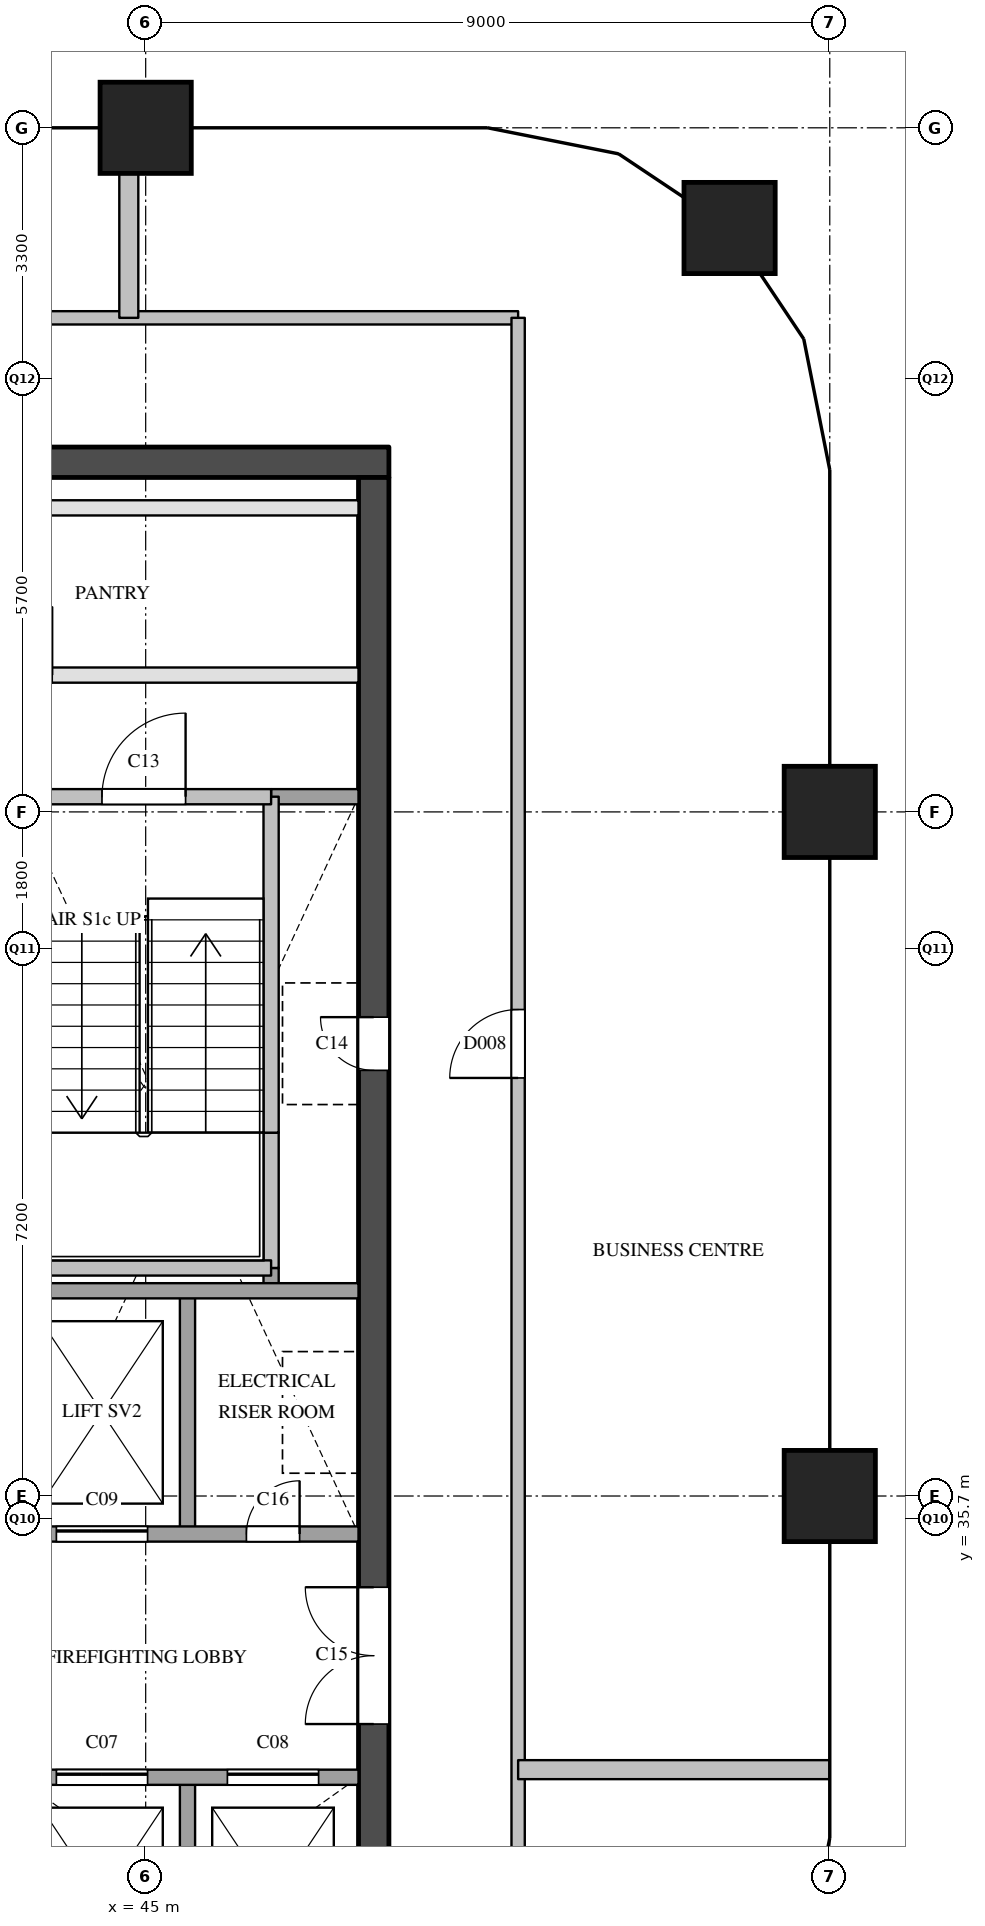
"""IFC4 building model, lengths in metres.
Left out: names, types, materials, properties, quantities, classifications, styles, units other than length and angle.
Written with IfcOpenShell. Run it as: python <this file> out.ifc"""

import sys

from ifc_helpers import new_model, si_unit, direction, frame, frame_2d, origin, origin_2d, place, context, subcontext, project, spatial, rectangle, extrude, element, fill, save


model = new_model("IFC4")
c1 = context("Model", 3, precision=1e-05, world=origin(), true_north=direction((0.0, 1.0)))
c2 = subcontext(c1, "Body", "Model", "MODEL_VIEW")
j1 = project(units=[si_unit("LENGTHUNIT", "METRE"), si_unit("PLANEANGLEUNIT", "RADIAN")], contexts=[c1])
p1 = place(None, origin())
s1 = spatial("IfcSite", under=j1, at=p1, CompositionType="ELEMENT")
p2 = place(p1, origin())
s2 = spatial("IfcBuilding", under=s1, at=p2, CompositionType="ELEMENT")
p3 = place(p2, frame((0.0, 0.0, 203.3)))
s3 = spatial("IfcBuildingStorey", under=s2, at=p3, CompositionType="ELEMENT", Elevation=203.3)
for number, where, z_axis, x_axis in (
    (1, (45.0, 54.0, 0.0), (0.0, 0.0, 1.0), (1.0, 0.0, 0.0)),
    (2, (54.0, 36.0, 0.0), (0.0, 0.0, 1.0), (1.0, 0.0, 0.0)),
    (3, (54.0, 45.0, 0.0), (0.0, 0.0, 1.0), (1.0, 0.0, 0.0)),
    (4, (52.682, 52.682, 0.0), (0.0, 0.0, 1.0), (1.0, 0.0, 0.0)),
):
    element("IfcColumn", number, at=place(p3, frame(where, z_axis=z_axis, x_axis=x_axis)), inside=s3, PredefinedType="COLUMN", context=c2, shape_type="SweptSolid", body=[
        extrude(rectangle(XDim=1.2, YDim=1.2, at=origin_2d()), origin(), (0.0, 0.0, 1.0), 3.9),
    ])
p4 = place(p3, frame((36.2, 49.6, 0.0), z_axis=(0.0, 0.0, 1.0), x_axis=(1.0, 0.0, 0.0)))
e5 = element("IfcWall", 5, at=p4, inside=s3, PredefinedType="SHEAR", context=c2, shape_type="SweptSolid", body=[
    extrude(rectangle(XDim=12.0, YDim=0.4, at=frame_2d((6.0, 0.0))), origin(), (0.0, 0.0, 1.0), 3.6),
])
p5 = place(p3, frame((48.0, 29.1, 0.0), z_axis=(0.0, 0.0, 1.0), x_axis=(0.0, 1.0, 0.0)))
e6 = element("IfcWall", 6, at=p5, inside=s3, PredefinedType="SHEAR", context=c2, shape_type="SweptSolid", body=[
    extrude(rectangle(XDim=20.3, YDim=0.4, at=frame_2d((10.15, 0.0))), origin(), (0.0, 0.0, 1.0), 3.6),
])
p6 = place(p5, frame((12.5, 0.0, 0.0)))
e7 = element("IfcOpeningElement", 7, at=p6, cuts=e6, PredefinedType="OPENING", context=c2, shape_type="SweptSolid", body=[
    extrude(rectangle(XDim=0.7, YDim=2.1, at=frame_2d((0.35, 1.05))), frame((0.0, 0.21, 0.0), z_axis=(0.0, -1.0, 0.0), x_axis=(1.0, 0.0, 0.0)), (0.0, 0.0, 1.0), 0.42),
])
p7 = place(p5, frame((3.9, 0.0, 0.0)))
e8 = element("IfcOpeningElement", 8, at=p7, cuts=e6, PredefinedType="OPENING", context=c2, shape_type="SweptSolid", body=[
    extrude(rectangle(XDim=1.8, YDim=2.1, at=frame_2d((0.9, 1.05))), frame((0.0, 0.21, 0.0), z_axis=(0.0, -1.0, 0.0), x_axis=(1.0, 0.0, 0.0)), (0.0, 0.0, 1.0), 0.42),
])
for number, where, z_axis, x_axis in (
    (9, (45.55, 29.1, 0.0), (0.0, 0.0, 1.0), (0.0, 1.0, 0.0)),
    (10, (45.55, 35.5, 0.0), (0.0, 0.0, 1.0), (0.0, 1.0, 0.0)),
):
    element("IfcWall", number, at=place(p3, frame(where, z_axis=z_axis, x_axis=x_axis)), inside=s3, PredefinedType="SOLIDWALL", context=c2, shape_type="SweptSolid", body=[
        extrude(rectangle(XDim=3.2, YDim=0.2, at=frame_2d((1.6, 0.0))), origin(), (0.0, 0.0, 1.0), 3.6),
    ])
p8 = place(p3, frame((46.65, 38.7, 0.0), z_axis=(0.0, 0.0, 1.0), x_axis=(0.0, 1.0, 0.0)))
e11 = element("IfcWall", 11, at=p8, inside=s3, PredefinedType="SOLIDWALL", context=c2, shape_type="SweptSolid", body=[
    extrude(rectangle(XDim=0.3, YDim=0.2, at=frame_2d((0.15, 0.0))), origin(), (0.0, 0.0, 1.0), 3.6),
])
p9 = place(p3, frame((46.65, 39.0, 0.0), z_axis=(0.0, 0.0, 1.0), x_axis=(0.0, 1.0, 0.0)))
e12 = element("IfcWall", 12, at=p9, inside=s3, PredefinedType="SOLIDWALL", context=c2, shape_type="SweptSolid", body=[
    extrude(rectangle(XDim=1.78, YDim=0.2, at=frame_2d((0.89, 0.0))), origin(), (0.0, 0.0, 1.0), 3.6),
])
p10 = place(p3, frame((46.65, 40.78, 0.0), z_axis=(0.0, 0.0, 1.0), x_axis=(0.0, 1.0, 0.0)))
e13 = element("IfcWall", 13, at=p10, inside=s3, PredefinedType="SOLIDWALL", context=c2, shape_type="SweptSolid", body=[
    extrude(rectangle(XDim=4.42, YDim=0.2, at=frame_2d((2.21, 0.0))), origin(), (0.0, 0.0, 1.0), 3.6),
])
p11 = place(p3, frame((36.6, 32.3, 0.0), z_axis=(0.0, 0.0, 1.0), x_axis=(1.0, 0.0, 0.0)))
e14 = element("IfcWall", 14, at=p11, inside=s3, PredefinedType="SOLIDWALL", context=c2, shape_type="SweptSolid", body=[
    extrude(rectangle(XDim=11.2, YDim=0.2, at=frame_2d((5.6, 0.0))), origin(), (0.0, 0.0, 1.0), 3.6),
])
p12 = place(p11, frame((7.225, 0.0, 0.0)))
e15 = element("IfcOpeningElement", 15, at=p12, cuts=e14, PredefinedType="OPENING", context=c2, shape_type="SweptSolid", body=[
    extrude(rectangle(XDim=1.2, YDim=2.1, at=frame_2d((0.6, 1.05))), frame((0.0, 0.11, 0.0), z_axis=(0.0, -1.0, 0.0), x_axis=(1.0, 0.0, 0.0)), (0.0, 0.0, 1.0), 0.22),
])
p13 = place(p11, frame((9.475, 0.0, 0.0)))
e16 = element("IfcOpeningElement", 16, at=p13, cuts=e14, PredefinedType="OPENING", context=c2, shape_type="SweptSolid", body=[
    extrude(rectangle(XDim=1.2, YDim=2.1, at=frame_2d((0.6, 1.05))), frame((0.0, 0.11, 0.0), z_axis=(0.0, -1.0, 0.0), x_axis=(1.0, 0.0, 0.0)), (0.0, 0.0, 1.0), 0.22),
])
p14 = place(p3, frame((43.3, 35.5, 0.0), z_axis=(0.0, 0.0, 1.0), x_axis=(1.0, 0.0, 0.0)))
e17 = element("IfcWall", 17, at=p14, inside=s3, PredefinedType="SOLIDWALL", context=c2, shape_type="SweptSolid", body=[
    extrude(rectangle(XDim=4.5, YDim=0.2, at=frame_2d((2.25, 0.0))), origin(), (0.0, 0.0, 1.0), 3.6),
])
p15 = place(p14, frame((0.525, 0.0, 0.0)))
e18 = element("IfcOpeningElement", 18, at=p15, cuts=e17, PredefinedType="OPENING", context=c2, shape_type="SweptSolid", body=[
    extrude(rectangle(XDim=1.2, YDim=2.1, at=frame_2d((0.6, 1.05))), frame((0.0, 0.11, 0.0), z_axis=(0.0, -1.0, 0.0), x_axis=(1.0, 0.0, 0.0)), (0.0, 0.0, 1.0), 0.22),
])
p16 = place(p14, frame((3.025, 0.0, 0.0)))
e19 = element("IfcOpeningElement", 19, at=p16, cuts=e17, PredefinedType="OPENING", context=c2, shape_type="SweptSolid", body=[
    extrude(rectangle(XDim=0.7, YDim=2.1, at=frame_2d((0.35, 1.05))), frame((0.0, 0.11, 0.0), z_axis=(0.0, -1.0, 0.0), x_axis=(1.0, 0.0, 0.0)), (0.0, 0.0, 1.0), 0.22),
])
p17 = place(p3, frame((43.3, 38.7, 0.0), z_axis=(0.0, 0.0, 1.0), x_axis=(1.0, 0.0, 0.0)))
e20 = element("IfcWall", 20, at=p17, inside=s3, PredefinedType="SOLIDWALL", context=c2, shape_type="SweptSolid", body=[
    extrude(rectangle(XDim=4.5, YDim=0.2, at=frame_2d((2.25, 0.0))), origin(), (0.0, 0.0, 1.0), 3.6),
])
p18 = place(p3, frame((43.4, 39.0, 0.0), z_axis=(0.0, 0.0, 1.0), x_axis=(1.0, 0.0, 0.0)))
e21 = element("IfcWall", 21, at=p18, inside=s3, PredefinedType="SOLIDWALL", context=c2, shape_type="SweptSolid", body=[
    extrude(rectangle(XDim=3.25, YDim=0.2, at=frame_2d((1.625, 0.0))), origin(), (0.0, 0.0, 1.0), 3.6),
])
p19 = place(p3, frame((46.65, 45.2, 0.0), z_axis=(0.0, 0.0, 1.0), x_axis=(1.0, 0.0, 0.0)))
e22 = element("IfcWall", 22, at=p19, inside=s3, PredefinedType="SOLIDWALL", context=c2, shape_type="SweptSolid", body=[
    extrude(rectangle(XDim=1.15, YDim=0.2, at=frame_2d((0.575, 0.0))), origin(), (0.0, 0.0, 1.0), 3.6),
])
p20 = place(p3, frame((36.6, 45.2, 0.0), z_axis=(0.0, 0.0, 1.0), x_axis=(1.0, 0.0, 0.0)))
e23 = element("IfcWall", 23, at=p20, inside=s3, PredefinedType="SOLIDWALL", context=c2, shape_type="SweptSolid", body=[
    extrude(rectangle(XDim=10.05, YDim=0.2, at=frame_2d((5.025, 0.0))), origin(), (0.0, 0.0, 1.0), 3.6),
])
p21 = place(p20, frame((1.125, 0.0, 0.0)))
e24 = element("IfcOpeningElement", 24, at=p21, cuts=e23, PredefinedType="OPENING", context=c2, shape_type="SweptSolid", body=[
    extrude(rectangle(XDim=1.1, YDim=2.1, at=frame_2d((0.55, 1.05))), frame((0.0, 0.11, 0.0), z_axis=(0.0, -1.0, 0.0), x_axis=(1.0, 0.0, 0.0)), (0.0, 0.0, 1.0), 0.22),
])
p22 = place(p20, frame((4.475, 0.0, 0.0)))
e25 = element("IfcOpeningElement", 25, at=p22, cuts=e23, PredefinedType="OPENING", context=c2, shape_type="SweptSolid", body=[
    extrude(rectangle(XDim=1.1, YDim=2.1, at=frame_2d((0.55, 1.05))), frame((0.0, 0.11, 0.0), z_axis=(0.0, -1.0, 0.0), x_axis=(1.0, 0.0, 0.0)), (0.0, 0.0, 1.0), 0.22),
])
p23 = place(p20, frame((7.825, 0.0, 0.0)))
e26 = element("IfcOpeningElement", 26, at=p23, cuts=e23, PredefinedType="OPENING", context=c2, shape_type="SweptSolid", body=[
    extrude(rectangle(XDim=1.1, YDim=2.1, at=frame_2d((0.55, 1.05))), frame((0.0, 0.11, 0.0), z_axis=(0.0, -1.0, 0.0), x_axis=(1.0, 0.0, 0.0)), (0.0, 0.0, 1.0), 0.22),
])
p24 = place(p3, frame((36.6, 46.8, 0.0), z_axis=(0.0, 0.0, 1.0), x_axis=(1.0, 0.0, 0.0)))
e27 = element("IfcWall", 27, at=p24, inside=s3, PredefinedType="PARTITIONING", context=c2, shape_type="SweptSolid", body=[
    extrude(rectangle(XDim=11.2, YDim=0.2, at=frame_2d((5.6, 0.0))), origin(), (0.0, 0.0, 1.0), 3.6),
])
p25 = place(p24, frame((0.67, 0.0, 0.0)))
e28 = element("IfcOpeningElement", 28, at=p25, cuts=e27, PredefinedType="OPENING", context=c2, shape_type="SweptSolid", body=[
    extrude(rectangle(XDim=0.9, YDim=2.1, at=frame_2d((0.45, 1.05))), frame((0.0, 0.11, 0.0), z_axis=(0.0, -1.0, 0.0), x_axis=(1.0, 0.0, 0.0)), (0.0, 0.0, 1.0), 0.22),
])
p26 = place(p24, frame((6.27, 0.0, 0.0)))
e29 = element("IfcOpeningElement", 29, at=p26, cuts=e27, PredefinedType="OPENING", context=c2, shape_type="SweptSolid", body=[
    extrude(rectangle(XDim=0.9, YDim=2.1, at=frame_2d((0.45, 1.05))), frame((0.0, 0.11, 0.0), z_axis=(0.0, -1.0, 0.0), x_axis=(1.0, 0.0, 0.0)), (0.0, 0.0, 1.0), 0.22),
])
p27 = place(p3, frame((36.6, 49.0, 0.0), z_axis=(0.0, 0.0, 1.0), x_axis=(1.0, 0.0, 0.0)))
e30 = element("IfcWall", 30, at=p27, inside=s3, PredefinedType="PARTITIONING", context=c2, shape_type="SweptSolid", body=[
    extrude(rectangle(XDim=11.2, YDim=0.2, at=frame_2d((5.6, 0.0))), origin(), (0.0, 0.0, 1.0), 3.6),
])
p28 = place(p3, frame((34.5, 51.5, 0.0), z_axis=(0.0, 0.0, 1.0), x_axis=(1.0, 0.0, 0.0)))
e31 = element("IfcWall", 31, at=p28, inside=s3, PredefinedType="PARTITIONING", context=c2, shape_type="SweptSolid", body=[
    extrude(rectangle(XDim=15.4, YDim=0.175, at=frame_2d((7.7, 0.0))), origin(), (0.0, 0.0, 1.0), 3.6),
])
p29 = place(p28, frame((4.689, 0.0, 0.0)))
e32 = element("IfcOpeningElement", 32, at=p29, cuts=e31, PredefinedType="OPENING", context=c2, shape_type="SweptSolid", body=[
    extrude(rectangle(XDim=0.9, YDim=2.1, at=frame_2d((0.45, 1.05))), frame((0.0, 0.097, 0.0), z_axis=(0.0, -1.0, 0.0), x_axis=(1.0, 0.0, 0.0)), (0.0, 0.0, 1.0), 0.195),
])
p30 = place(p3, frame((49.9, 28.5, 0.0), z_axis=(0.0, 0.0, 1.0), x_axis=(0.0, 1.0, 0.0)))
e33 = element("IfcWall", 33, at=p30, inside=s3, PredefinedType="PARTITIONING", context=c2, shape_type="SweptSolid", body=[
    extrude(rectangle(XDim=23.0, YDim=0.175, at=frame_2d((11.5, 0.0))), origin(), (0.0, 0.0, 1.0), 3.6),
])
p31 = place(p30, frame((13.0, 0.0, 0.0)))
e34 = element("IfcOpeningElement", 34, at=p31, cuts=e33, PredefinedType="OPENING", context=c2, shape_type="SweptSolid", body=[
    extrude(rectangle(XDim=0.9, YDim=2.1, at=frame_2d((0.45, 1.05))), frame((0.0, 0.097, 0.0), z_axis=(0.0, -1.0, 0.0), x_axis=(1.0, 0.0, 0.0)), (0.0, 0.0, 1.0), 0.195),
])
p32 = place(p3, frame((49.9, 32.4, 0.0), z_axis=(0.0, 0.0, 1.0), x_axis=(1.0, 0.0, 0.0)))
e35 = element("IfcWall", 35, at=p32, inside=s3, PredefinedType="PARTITIONING", context=c2, shape_type="SweptSolid", body=[
    extrude(rectangle(XDim=4.1, YDim=0.25, at=frame_2d((2.05, 0.0))), origin(), (0.0, 0.0, 1.0), 2.6),
])
p33 = place(p3, frame((44.778, 51.5, 0.0), z_axis=(0.0, 0.0, 1.0), x_axis=(0.0, 1.0, 0.0)))
e36 = element("IfcWall", 36, at=p33, inside=s3, PredefinedType="PARTITIONING", context=c2, shape_type="SweptSolid", body=[
    extrude(rectangle(XDim=2.5, YDim=0.25, at=frame_2d((1.25, 0.0))), origin(), (0.0, 0.0, 1.0), 3.6),
])
p34 = place(p12, origin())
e37 = element("IfcDoor", 37, at=p34, inside=s3, OperationType="SLIDING_TO_LEFT", PredefinedType="DOOR", context=c2, shape_type="SweptSolid", body=[
    extrude(rectangle(XDim=1.2, YDim=2.1, at=frame_2d((0.6, 1.05))), frame((0.0, 0.025, 0.0), z_axis=(0.0, -1.0, 0.0), x_axis=(1.0, 0.0, 0.0)), (0.0, 0.0, 1.0), 0.05),
])
fill(e15, e37)
p35 = place(p13, origin())
e38 = element("IfcDoor", 38, at=p35, inside=s3, OperationType="SLIDING_TO_LEFT", PredefinedType="DOOR", context=c2, shape_type="SweptSolid", body=[
    extrude(rectangle(XDim=1.2, YDim=2.1, at=frame_2d((0.6, 1.05))), frame((0.0, 0.025, 0.0), z_axis=(0.0, -1.0, 0.0), x_axis=(1.0, 0.0, 0.0)), (0.0, 0.0, 1.0), 0.05),
])
fill(e16, e38)
p36 = place(p15, origin())
e39 = element("IfcDoor", 39, at=p36, inside=s3, OperationType="SLIDING_TO_LEFT", PredefinedType="DOOR", context=c2, shape_type="SweptSolid", body=[
    extrude(rectangle(XDim=1.2, YDim=2.1, at=frame_2d((0.6, 1.05))), frame((0.0, 0.025, 0.0), z_axis=(0.0, -1.0, 0.0), x_axis=(1.0, 0.0, 0.0)), (0.0, 0.0, 1.0), 0.05),
])
fill(e18, e39)
p37 = place(p23, origin())
e40 = element("IfcDoor", 40, at=p37, inside=s3, OperationType="SINGLE_SWING_RIGHT", PredefinedType="DOOR", context=c2, shape_type="SweptSolid", body=[
    extrude(rectangle(XDim=1.1, YDim=2.1, at=frame_2d((0.55, 1.05))), frame((0.0, 0.025, 0.0), z_axis=(0.0, -1.0, 0.0), x_axis=(1.0, 0.0, 0.0)), (0.0, 0.0, 1.0), 0.05),
])
fill(e26, e40)
p38 = place(p6, origin())
e41 = element("IfcDoor", 41, at=p38, inside=s3, OperationType="SINGLE_SWING_RIGHT", PredefinedType="DOOR", context=c2, shape_type="SweptSolid", body=[
    extrude(rectangle(XDim=0.7, YDim=2.1, at=frame_2d((0.35, 1.05))), frame((0.0, 0.025, 0.0), z_axis=(0.0, -1.0, 0.0), x_axis=(1.0, 0.0, 0.0)), (0.0, 0.0, 1.0), 0.05),
])
fill(e7, e41)
p39 = place(p7, origin())
e42 = element("IfcDoor", 42, at=p39, inside=s3, OperationType="DOUBLE_DOOR_SINGLE_SWING", PredefinedType="DOOR", context=c2, shape_type="SweptSolid", body=[
    extrude(rectangle(XDim=1.8, YDim=2.1, at=frame_2d((0.9, 1.05))), frame((0.0, 0.025, 0.0), z_axis=(0.0, -1.0, 0.0), x_axis=(1.0, 0.0, 0.0)), (0.0, 0.0, 1.0), 0.05),
])
fill(e8, e42)
p40 = place(p16, origin())
e43 = element("IfcDoor", 43, at=p40, inside=s3, OperationType="SINGLE_SWING_RIGHT", PredefinedType="DOOR", context=c2, shape_type="SweptSolid", body=[
    extrude(rectangle(XDim=0.7, YDim=2.1, at=frame_2d((0.35, 1.05))), frame((0.0, 0.025, 0.0), z_axis=(0.0, -1.0, 0.0), x_axis=(1.0, 0.0, 0.0)), (0.0, 0.0, 1.0), 0.05),
])
fill(e19, e43)
p41 = place(p31, origin())
e44 = element("IfcDoor", 44, at=p41, inside=s3, OperationType="SINGLE_SWING_LEFT", PredefinedType="DOOR", context=c2, shape_type="SweptSolid", body=[
    extrude(rectangle(XDim=0.9, YDim=2.1, at=frame_2d((0.45, 1.05))), frame((0.0, 0.025, 0.0), z_axis=(0.0, -1.0, 0.0), x_axis=(1.0, 0.0, 0.0)), (0.0, 0.0, 1.0), 0.05),
])
fill(e34, e44)
save(model, sys.argv[1])
